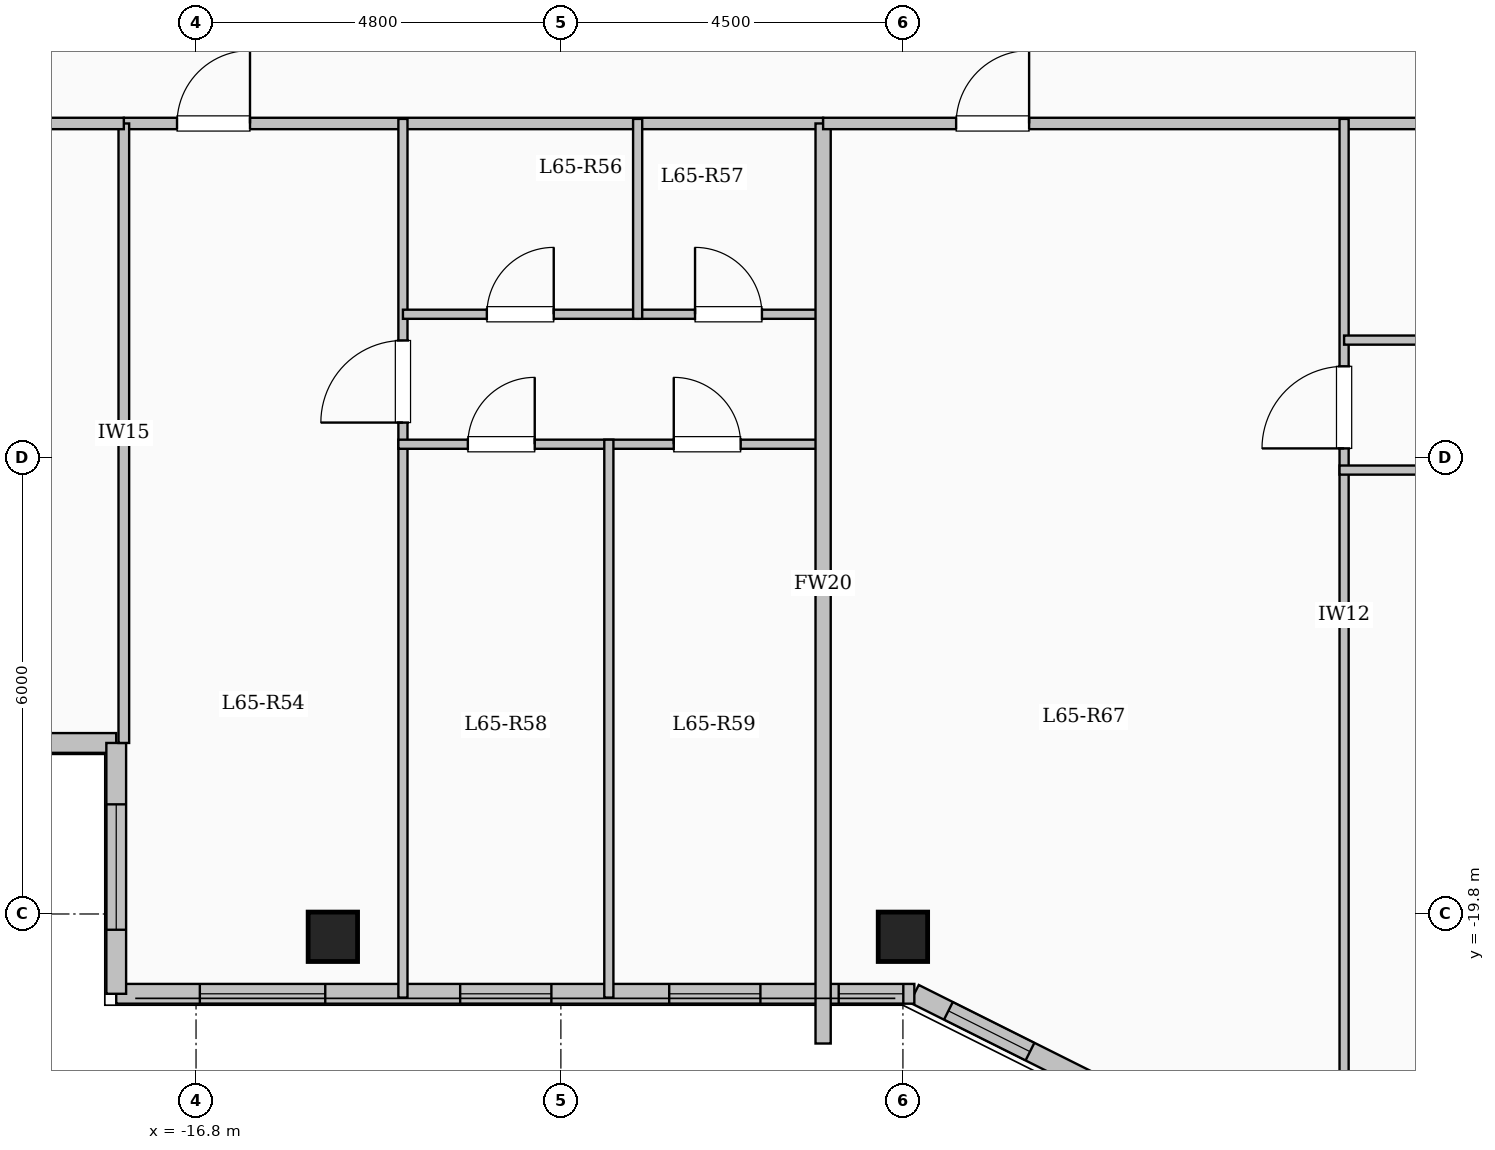
"""IFC4 building model, lengths in metres.
Left out: names, types, materials, properties, quantities, classifications, styles, units other than length and angle.
Written with IfcOpenShell. Run it as: python <this file> out.ifc"""

import sys

from ifc_helpers import new_model, si_unit, direction, frame, frame_2d, origin, origin_2d, place, context, subcontext, project, spatial, rectangle, extrude, element, fill, save


model = new_model("IFC4")
c1 = context("Model", 3, precision=1e-05, world=origin(), true_north=direction((0.0, 1.0)))
c2 = subcontext(c1, "Body", "Model", "MODEL_VIEW")
j1 = project(units=[si_unit("LENGTHUNIT", "METRE"), si_unit("PLANEANGLEUNIT", "RADIAN")], contexts=[c1])
p1 = place(None, origin())
s1 = spatial("IfcSite", under=j1, at=p1, CompositionType="ELEMENT")
p2 = place(p1, origin())
s2 = spatial("IfcBuilding", under=s1, at=p2, CompositionType="ELEMENT")
p3 = place(p2, frame((0.0, 0.0, 241.5)))
s3 = spatial("IfcBuildingStorey", under=s2, at=p3, CompositionType="ELEMENT", Elevation=241.5)
for number, where, z_axis, x_axis in (
    (1, (-15.0, -20.1, 0.0), (0.0, 0.0, 1.0), (1.0, 0.0, 0.0)),
    (2, (-7.5, -20.1, 0.0), (0.0, 0.0, 1.0), (1.0, 0.0, 0.0)),
):
    element("IfcColumn", number, at=place(p3, frame(where, z_axis=z_axis, x_axis=x_axis)), inside=s3, PredefinedType="COLUMN", context=c2, shape_type="SweptSolid", body=[
        extrude(rectangle(XDim=0.65, YDim=0.65, at=origin_2d()), origin(), (0.0, 0.0, 1.0), 3.35),
    ])
p4 = place(p3, frame((-17.85, -17.55, 0.0), z_axis=(0.0, 0.0, 1.0), x_axis=(-1.0, 0.0, 0.0)))
e3 = element("IfcWall", 3, at=p4, inside=s3, PredefinedType="SOLIDWALL", context=c2, shape_type="SweptSolid", body=[
    extrude(rectangle(XDim=4.8, YDim=0.26, at=frame_2d((2.4, 0.0))), origin(), (0.0, 0.0, 1.0), 3.1),
])
p5 = place(p4, frame((1.275, 0.0, 0.9)))
e4 = element("IfcOpeningElement", 4, at=p5, cuts=e3, PredefinedType="OPENING", context=c2, shape_type="SweptSolid", body=[
    extrude(rectangle(XDim=2.2, YDim=1.75, at=frame_2d((1.1, 0.875))), frame((0.0, 0.14, 0.0), z_axis=(0.0, -1.0, 0.0), x_axis=(1.0, 0.0, 0.0)), (0.0, 0.0, 1.0), 0.28),
])
p6 = place(p3, frame((-4.35, -22.35, 0.0), z_axis=(0.0, 0.0, 1.0), x_axis=(-0.894427191, 0.4472135955, 0.0)))
e5 = element("IfcWall", 5, at=p6, inside=s3, PredefinedType="SOLIDWALL", context=c2, shape_type="SweptSolid", body=[
    extrude(rectangle(XDim=3.354, YDim=0.26, at=frame_2d((1.677, 0.0))), origin(), (0.0, 0.0, 1.0), 3.1),
])
p7 = place(p6, frame((1.653, 0.0, 0.95)))
e6 = element("IfcOpeningElement", 6, at=p7, cuts=e5, PredefinedType="OPENING", context=c2, shape_type="SweptSolid", body=[
    extrude(rectangle(XDim=1.2, YDim=1.5, at=frame_2d((0.6, 0.75))), frame((0.0, 0.14, 0.0), z_axis=(0.0, -1.0, 0.0), x_axis=(1.0, 0.0, 0.0)), (0.0, 0.0, 1.0), 0.28),
])
p8 = place(p3, frame((-7.35, -20.85, 0.0), z_axis=(0.0, 0.0, 1.0), x_axis=(-1.0, 0.0, 0.0)))
e7 = element("IfcWall", 7, at=p8, inside=s3, PredefinedType="SOLIDWALL", context=c2, shape_type="SweptSolid", body=[
    extrude(rectangle(XDim=10.5, YDim=0.26, at=frame_2d((5.25, 0.0))), origin(), (0.0, 0.0, 1.0), 3.1),
])
p9 = place(p8, frame((0.145, 0.0, 0.95)))
e8 = element("IfcOpeningElement", 8, at=p9, cuts=e7, PredefinedType="OPENING", context=c2, shape_type="SweptSolid", body=[
    extrude(rectangle(XDim=0.85, YDim=1.5, at=frame_2d((0.425, 0.75))), frame((0.0, 0.14, 0.0), z_axis=(0.0, -1.0, 0.0), x_axis=(1.0, 0.0, 0.0)), (0.0, 0.0, 1.0), 0.28),
])
p10 = place(p8, frame((2.025, 0.0, 0.95)))
e9 = element("IfcOpeningElement", 9, at=p10, cuts=e7, PredefinedType="OPENING", context=c2, shape_type="SweptSolid", body=[
    extrude(rectangle(XDim=1.2, YDim=1.5, at=frame_2d((0.6, 0.75))), frame((0.0, 0.14, 0.0), z_axis=(0.0, -1.0, 0.0), x_axis=(1.0, 0.0, 0.0)), (0.0, 0.0, 1.0), 0.28),
])
p11 = place(p8, frame((4.775, 0.0, 0.95)))
e10 = element("IfcOpeningElement", 10, at=p11, cuts=e7, PredefinedType="OPENING", context=c2, shape_type="SweptSolid", body=[
    extrude(rectangle(XDim=1.2, YDim=1.5, at=frame_2d((0.6, 0.75))), frame((0.0, 0.14, 0.0), z_axis=(0.0, -1.0, 0.0), x_axis=(1.0, 0.0, 0.0)), (0.0, 0.0, 1.0), 0.28),
])
p12 = place(p8, frame((7.75, 0.0, 0.9)))
e11 = element("IfcOpeningElement", 11, at=p12, cuts=e7, PredefinedType="OPENING", context=c2, shape_type="SweptSolid", body=[
    extrude(rectangle(XDim=1.65, YDim=1.6, at=frame_2d((0.825, 0.8))), frame((0.0, 0.14, 0.0), z_axis=(0.0, -1.0, 0.0), x_axis=(1.0, 0.0, 0.0)), (0.0, 0.0, 1.0), 0.28),
])
p13 = place(p3, frame((-17.85, -20.85, 0.0), z_axis=(0.0, 0.0, 1.0), x_axis=(0.0, 1.0, 0.0)))
e12 = element("IfcWall", 12, at=p13, inside=s3, PredefinedType="SOLIDWALL", context=c2, shape_type="SweptSolid", body=[
    extrude(rectangle(XDim=3.3, YDim=0.26, at=frame_2d((1.65, 0.0))), origin(), (0.0, 0.0, 1.0), 3.1),
])
p14 = place(p13, frame((0.843, 0.0, 0.9)))
e13 = element("IfcOpeningElement", 13, at=p14, cuts=e12, PredefinedType="OPENING", context=c2, shape_type="SweptSolid", body=[
    extrude(rectangle(XDim=1.65, YDim=1.6, at=frame_2d((0.825, 0.8))), frame((0.0, 0.14, 0.0), z_axis=(0.0, -1.0, 0.0), x_axis=(1.0, 0.0, 0.0)), (0.0, 0.0, 1.0), 0.28),
])
p15 = place(p3, frame((-17.75, -9.4, 0.0), z_axis=(0.0, 0.0, 1.0), x_axis=(1.0, 0.0, 0.0)))
e14 = element("IfcWall", 14, at=p15, inside=s3, PredefinedType="PARTITIONING", context=c2, shape_type="SweptSolid", body=[
    extrude(rectangle(XDim=9.2, YDim=0.15, at=frame_2d((4.6, 0.0))), origin(), (0.0, 0.0, 1.0), 3.1),
])
p16 = place(p15, frame((0.7, 0.0, 0.0)))
e15 = element("IfcOpeningElement", 15, at=p16, cuts=e14, PredefinedType="OPENING", context=c2, shape_type="SweptSolid", body=[
    extrude(rectangle(XDim=0.96, YDim=2.15, at=frame_2d((0.48, 1.075))), frame((0.0, 0.085, 0.0), z_axis=(0.0, -1.0, 0.0), x_axis=(1.0, 0.0, 0.0)), (0.0, 0.0, 1.0), 0.17),
])
p17 = place(p3, frame((-14.078, -20.9, 0.0), z_axis=(0.0, 0.0, 1.0), x_axis=(0.0, 1.0, 0.0)))
e16 = element("IfcWall", 16, at=p17, inside=s3, PredefinedType="PARTITIONING", context=c2, shape_type="SweptSolid", body=[
    extrude(rectangle(XDim=11.56, YDim=0.12, at=frame_2d((5.78, 0.0))), origin(), (0.0, 0.0, 1.0), 3.1),
])
p18 = place(p17, frame((7.565, 0.0, 0.0)))
e17 = element("IfcOpeningElement", 17, at=p18, cuts=e16, PredefinedType="OPENING", context=c2, shape_type="SweptSolid", body=[
    extrude(rectangle(XDim=1.08, YDim=2.15, at=frame_2d((0.54, 1.075))), frame((0.0, 0.07, 0.0), z_axis=(0.0, -1.0, 0.0), x_axis=(1.0, 0.0, 0.0)), (0.0, 0.0, 1.0), 0.14),
])
p19 = place(p3, frame((-14.078, -11.91, 0.0), z_axis=(0.0, 0.0, 1.0), x_axis=(1.0, 0.0, 0.0)))
e18 = element("IfcWall", 18, at=p19, inside=s3, PredefinedType="PARTITIONING", context=c2, shape_type="SweptSolid", body=[
    extrude(rectangle(XDim=3.088, YDim=0.12, at=frame_2d((1.544, 0.0))), origin(), (0.0, 0.0, 1.0), 3.1),
])
p20 = place(p19, frame((1.104, 0.0, 0.0)))
e19 = element("IfcOpeningElement", 19, at=p20, cuts=e18, PredefinedType="OPENING", context=c2, shape_type="SweptSolid", body=[
    extrude(rectangle(XDim=0.88, YDim=2.1, at=frame_2d((0.44, 1.05))), frame((0.0, 0.07, 0.0), z_axis=(0.0, -1.0, 0.0), x_axis=(1.0, 0.0, 0.0)), (0.0, 0.0, 1.0), 0.14),
])
p21 = place(p3, frame((-10.99, -11.91, 0.0), z_axis=(0.0, 0.0, 1.0), x_axis=(1.0, 0.0, 0.0)))
e20 = element("IfcWall", 20, at=p21, inside=s3, PredefinedType="PARTITIONING", context=c2, shape_type="SweptSolid", body=[
    extrude(rectangle(XDim=2.39, YDim=0.12, at=frame_2d((1.195, 0.0))), origin(), (0.0, 0.0, 1.0), 3.1),
])
p22 = place(p21, frame((0.755, 0.0, 0.0)))
e21 = element("IfcOpeningElement", 21, at=p22, cuts=e20, PredefinedType="OPENING", context=c2, shape_type="SweptSolid", body=[
    extrude(rectangle(XDim=0.88, YDim=2.1, at=frame_2d((0.44, 1.05))), frame((0.0, 0.07, 0.0), z_axis=(0.0, -1.0, 0.0), x_axis=(1.0, 0.0, 0.0)), (0.0, 0.0, 1.0), 0.14),
])
p23 = place(p3, frame((-14.138, -13.62, 0.0), z_axis=(0.0, 0.0, 1.0), x_axis=(1.0, 0.0, 0.0)))
e22 = element("IfcWall", 22, at=p23, inside=s3, PredefinedType="PARTITIONING", context=c2, shape_type="SweptSolid", body=[
    extrude(rectangle(XDim=5.598, YDim=0.12, at=frame_2d((2.799, 0.0))), origin(), (0.0, 0.0, 1.0), 3.1),
])
p24 = place(p23, frame((0.914, 0.0, 0.0)))
e23 = element("IfcOpeningElement", 23, at=p24, cuts=e22, PredefinedType="OPENING", context=c2, shape_type="SweptSolid", body=[
    extrude(rectangle(XDim=0.88, YDim=2.1, at=frame_2d((0.44, 1.05))), frame((0.0, 0.07, 0.0), z_axis=(0.0, -1.0, 0.0), x_axis=(1.0, 0.0, 0.0)), (0.0, 0.0, 1.0), 0.14),
])
p25 = place(p23, frame((3.623, 0.0, 0.0)))
e24 = element("IfcOpeningElement", 24, at=p25, cuts=e22, PredefinedType="OPENING", context=c2, shape_type="SweptSolid", body=[
    extrude(rectangle(XDim=0.88, YDim=2.1, at=frame_2d((0.44, 1.05))), frame((0.0, 0.07, 0.0), z_axis=(0.0, -1.0, 0.0), x_axis=(1.0, 0.0, 0.0)), (0.0, 0.0, 1.0), 0.14),
])
p26 = place(p3, frame((-10.99, -11.97, 0.0), z_axis=(0.0, 0.0, 1.0), x_axis=(0.0, 1.0, 0.0)))
e25 = element("IfcWall", 25, at=p26, inside=s3, PredefinedType="PARTITIONING", context=c2, shape_type="SweptSolid", body=[
    extrude(rectangle(XDim=2.63, YDim=0.12, at=frame_2d((1.315, 0.0))), origin(), (0.0, 0.0, 1.0), 3.1),
])
p27 = place(p3, frame((-11.369, -20.9, 0.0), z_axis=(0.0, 0.0, 1.0), x_axis=(0.0, 1.0, 0.0)))
e26 = element("IfcWall", 26, at=p27, inside=s3, PredefinedType="PARTITIONING", context=c2, shape_type="SweptSolid", body=[
    extrude(rectangle(XDim=7.34, YDim=0.12, at=frame_2d((3.67, 0.0))), origin(), (0.0, 0.0, 1.0), 3.1),
])
p28 = place(p3, frame((-8.55, -21.504, 0.0), z_axis=(0.0, 0.0, 1.0), x_axis=(0.0, 1.0, 0.0)))
e27 = element("IfcWall", 27, at=p28, inside=s3, PredefinedType="SOLIDWALL", context=c2, shape_type="SweptSolid", body=[
    extrude(rectangle(XDim=12.104, YDim=0.2, at=frame_2d((6.052, 0.0))), origin(), (0.0, 0.0, 1.0), 3.1),
])
p29 = place(p3, frame((-8.55, -9.4, 0.0), z_axis=(0.0, 0.0, 1.0), x_axis=(1.0, 0.0, 0.0)))
e28 = element("IfcWall", 28, at=p29, inside=s3, PredefinedType="PARTITIONING", context=c2, shape_type="SweptSolid", body=[
    extrude(rectangle(XDim=17.1, YDim=0.15, at=frame_2d((8.55, 0.0))), origin(), (0.0, 0.0, 1.0), 3.1),
])
p30 = place(p29, frame((1.75, 0.0, 0.0)))
e29 = element("IfcOpeningElement", 29, at=p30, cuts=e28, PredefinedType="OPENING", context=c2, shape_type="SweptSolid", body=[
    extrude(rectangle(XDim=0.96, YDim=2.15, at=frame_2d((0.48, 1.075))), frame((0.0, 0.085, 0.0), z_axis=(0.0, -1.0, 0.0), x_axis=(1.0, 0.0, 0.0)), (0.0, 0.0, 1.0), 0.17),
])
p31 = place(p3, frame((-1.696, -22.38, 0.0), z_axis=(0.0, 0.0, 1.0), x_axis=(0.0, 1.0, 0.0)))
e30 = element("IfcWall", 30, at=p31, inside=s3, PredefinedType="PARTITIONING", context=c2, shape_type="SweptSolid", body=[
    extrude(rectangle(XDim=13.04, YDim=0.12, at=frame_2d((6.52, 0.0))), origin(), (0.0, 0.0, 1.0), 3.1),
])
p32 = place(p31, frame((8.705, 0.0, 0.0)))
e31 = element("IfcOpeningElement", 31, at=p32, cuts=e30, PredefinedType="OPENING", context=c2, shape_type="SweptSolid", body=[
    extrude(rectangle(XDim=1.08, YDim=2.15, at=frame_2d((0.54, 1.075))), frame((0.0, 0.07, 0.0), z_axis=(0.0, -1.0, 0.0), x_axis=(1.0, 0.0, 0.0)), (0.0, 0.0, 1.0), 0.14),
])
p33 = place(p3, frame((-1.696, -12.25, 0.0), z_axis=(0.0, 0.0, 1.0), x_axis=(1.0, 0.0, 0.0)))
e32 = element("IfcWall", 32, at=p33, inside=s3, PredefinedType="PARTITIONING", context=c2, shape_type="SweptSolid", body=[
    extrude(rectangle(XDim=5.393, YDim=0.12, at=frame_2d((2.697, 0.0))), origin(), (0.0, 0.0, 1.0), 2.785),
])
p34 = place(p33, frame((2.256, 0.0, 0.0)))
e33 = element("IfcOpeningElement", 33, at=p34, cuts=e32, PredefinedType="OPENING", context=c2, shape_type="SweptSolid", body=[
    extrude(rectangle(XDim=0.88, YDim=2.1, at=frame_2d((0.44, 1.05))), frame((0.0, 0.07, 0.0), z_axis=(0.0, -1.0, 0.0), x_axis=(1.0, 0.0, 0.0)), (0.0, 0.0, 1.0), 0.14),
])
p35 = place(p3, frame((-1.756, -13.96, 0.0), z_axis=(0.0, 0.0, 1.0), x_axis=(1.0, 0.0, 0.0)))
e34 = element("IfcWall", 34, at=p35, inside=s3, PredefinedType="PARTITIONING", context=c2, shape_type="SweptSolid", body=[
    extrude(rectangle(XDim=10.366, YDim=0.12, at=frame_2d((5.183, 0.0))), origin(), (0.0, 0.0, 1.0), 2.785),
])
p36 = place(p35, frame((1.256, 0.0, 0.0)))
e35 = element("IfcOpeningElement", 35, at=p36, cuts=e34, PredefinedType="OPENING", context=c2, shape_type="SweptSolid", body=[
    extrude(rectangle(XDim=0.88, YDim=2.1, at=frame_2d((0.44, 1.05))), frame((0.0, 0.07, 0.0), z_axis=(0.0, -1.0, 0.0), x_axis=(1.0, 0.0, 0.0)), (0.0, 0.0, 1.0), 0.14),
])
p37 = place(p35, frame((4.648, 0.0, 0.0)))
e36 = element("IfcOpeningElement", 36, at=p37, cuts=e34, PredefinedType="OPENING", context=c2, shape_type="SweptSolid", body=[
    extrude(rectangle(XDim=0.88, YDim=2.1, at=frame_2d((0.44, 1.05))), frame((0.0, 0.07, 0.0), z_axis=(0.0, -1.0, 0.0), x_axis=(1.0, 0.0, 0.0)), (0.0, 0.0, 1.0), 0.14),
])
p38 = place(p35, frame((8.04, 0.0, 0.0)))
e37 = element("IfcOpeningElement", 37, at=p38, cuts=e34, PredefinedType="OPENING", context=c2, shape_type="SweptSolid", body=[
    extrude(rectangle(XDim=0.88, YDim=2.1, at=frame_2d((0.44, 1.05))), frame((0.0, 0.07, 0.0), z_axis=(0.0, -1.0, 0.0), x_axis=(1.0, 0.0, 0.0)), (0.0, 0.0, 1.0), 0.14),
])
p39 = place(p3, frame((-17.75, -17.55, 0.0), z_axis=(0.0, 0.0, 1.0), x_axis=(0.0, 1.0, 0.0)))
e38 = element("IfcWall", 38, at=p39, inside=s3, PredefinedType="PARTITIONING", context=c2, shape_type="SweptSolid", body=[
    extrude(rectangle(XDim=8.15, YDim=0.14, at=frame_2d((4.075, 0.0))), origin(), (0.0, 0.0, 1.0), 3.1),
])
p40 = place(p3, frame((-22.68, -9.4, 0.0), z_axis=(0.0, 0.0, 1.0), x_axis=(1.0, 0.0, 0.0)))
e39 = element("IfcWall", 39, at=p40, inside=s3, PredefinedType="PARTITIONING", context=c2, shape_type="SweptSolid", body=[
    extrude(rectangle(XDim=4.93, YDim=0.15, at=frame_2d((2.465, 0.0))), origin(), (0.0, 0.0, 1.0), 3.1),
])
p41 = place(p40, frame((1.99, 0.0, 0.0)))
e40 = element("IfcOpeningElement", 40, at=p41, cuts=e39, PredefinedType="OPENING", context=c2, shape_type="SweptSolid", body=[
    extrude(rectangle(XDim=0.95, YDim=2.15, at=frame_2d((0.475, 1.075))), frame((0.0, 0.085, 0.0), z_axis=(0.0, -1.0, 0.0), x_axis=(1.0, 0.0, 0.0)), (0.0, 0.0, 1.0), 0.17),
])
p42 = place(p7, origin())
e41 = element("IfcWindow", 41, at=p42, inside=s3, PartitioningType="SINGLE_PANEL", PredefinedType="WINDOW", context=c2, shape_type="SweptSolid", body=[
    extrude(rectangle(XDim=1.2, YDim=1.5, at=frame_2d((0.6, 0.75))), frame((0.0, 0.03, 0.0), z_axis=(0.0, -1.0, 0.0), x_axis=(1.0, 0.0, 0.0)), (0.0, 0.0, 1.0), 0.06),
])
fill(e6, e41)
p43 = place(p9, origin())
e42 = element("IfcWindow", 42, at=p43, inside=s3, PartitioningType="SINGLE_PANEL", PredefinedType="WINDOW", context=c2, shape_type="SweptSolid", body=[
    extrude(rectangle(XDim=0.85, YDim=1.5, at=frame_2d((0.425, 0.75))), frame((0.0, 0.03, 0.0), z_axis=(0.0, -1.0, 0.0), x_axis=(1.0, 0.0, 0.0)), (0.0, 0.0, 1.0), 0.06),
])
fill(e8, e42)
p44 = place(p10, origin())
e43 = element("IfcWindow", 43, at=p44, inside=s3, PartitioningType="SINGLE_PANEL", PredefinedType="WINDOW", context=c2, shape_type="SweptSolid", body=[
    extrude(rectangle(XDim=1.2, YDim=1.5, at=frame_2d((0.6, 0.75))), frame((0.0, 0.03, 0.0), z_axis=(0.0, -1.0, 0.0), x_axis=(1.0, 0.0, 0.0)), (0.0, 0.0, 1.0), 0.06),
])
fill(e9, e43)
p45 = place(p11, origin())
e44 = element("IfcWindow", 44, at=p45, inside=s3, PartitioningType="SINGLE_PANEL", PredefinedType="WINDOW", context=c2, shape_type="SweptSolid", body=[
    extrude(rectangle(XDim=1.2, YDim=1.5, at=frame_2d((0.6, 0.75))), frame((0.0, 0.03, 0.0), z_axis=(0.0, -1.0, 0.0), x_axis=(1.0, 0.0, 0.0)), (0.0, 0.0, 1.0), 0.06),
])
fill(e10, e44)
p46 = place(p12, origin())
e45 = element("IfcWindow", 45, at=p46, inside=s3, PartitioningType="SINGLE_PANEL", PredefinedType="WINDOW", context=c2, shape_type="SweptSolid", body=[
    extrude(rectangle(XDim=1.65, YDim=1.6, at=frame_2d((0.825, 0.8))), frame((0.0, 0.03, 0.0), z_axis=(0.0, -1.0, 0.0), x_axis=(1.0, 0.0, 0.0)), (0.0, 0.0, 1.0), 0.06),
])
fill(e11, e45)
p47 = place(p14, origin())
e46 = element("IfcWindow", 46, at=p47, inside=s3, PartitioningType="SINGLE_PANEL", PredefinedType="WINDOW", context=c2, shape_type="SweptSolid", body=[
    extrude(rectangle(XDim=1.65, YDim=1.6, at=frame_2d((0.825, 0.8))), frame((0.0, 0.03, 0.0), z_axis=(0.0, -1.0, 0.0), x_axis=(1.0, 0.0, 0.0)), (0.0, 0.0, 1.0), 0.06),
])
fill(e13, e46)
p48 = place(p16, origin())
e47 = element("IfcDoor", 47, at=p48, inside=s3, OperationType="SINGLE_SWING_RIGHT", PredefinedType="DOOR", context=c2, shape_type="SweptSolid", body=[
    extrude(rectangle(XDim=0.96, YDim=2.15, at=frame_2d((0.48, 1.075))), frame((0.0, 0.025, 0.0), z_axis=(0.0, -1.0, 0.0), x_axis=(1.0, 0.0, 0.0)), (0.0, 0.0, 1.0), 0.05),
])
fill(e15, e47)
p49 = place(p18, origin())
e48 = element("IfcDoor", 48, at=p49, inside=s3, OperationType="SINGLE_SWING_LEFT", PredefinedType="DOOR", context=c2, shape_type="SweptSolid", body=[
    extrude(rectangle(XDim=1.08, YDim=2.15, at=frame_2d((0.54, 1.075))), frame((0.0, 0.025, 0.0), z_axis=(0.0, -1.0, 0.0), x_axis=(1.0, 0.0, 0.0)), (0.0, 0.0, 1.0), 0.05),
])
fill(e17, e48)
p50 = place(p20, origin())
e49 = element("IfcDoor", 49, at=p50, inside=s3, OperationType="SINGLE_SWING_RIGHT", PredefinedType="DOOR", context=c2, shape_type="SweptSolid", body=[
    extrude(rectangle(XDim=0.88, YDim=2.1, at=frame_2d((0.44, 1.05))), frame((0.0, 0.025, 0.0), z_axis=(0.0, -1.0, 0.0), x_axis=(1.0, 0.0, 0.0)), (0.0, 0.0, 1.0), 0.05),
])
fill(e19, e49)
p51 = place(p22, origin())
e50 = element("IfcDoor", 50, at=p51, inside=s3, OperationType="SINGLE_SWING_LEFT", PredefinedType="DOOR", context=c2, shape_type="SweptSolid", body=[
    extrude(rectangle(XDim=0.88, YDim=2.1, at=frame_2d((0.44, 1.05))), frame((0.0, 0.025, 0.0), z_axis=(0.0, -1.0, 0.0), x_axis=(1.0, 0.0, 0.0)), (0.0, 0.0, 1.0), 0.05),
])
fill(e21, e50)
p52 = place(p24, origin())
e51 = element("IfcDoor", 51, at=p52, inside=s3, OperationType="SINGLE_SWING_RIGHT", PredefinedType="DOOR", context=c2, shape_type="SweptSolid", body=[
    extrude(rectangle(XDim=0.88, YDim=2.1, at=frame_2d((0.44, 1.05))), frame((0.0, 0.025, 0.0), z_axis=(0.0, -1.0, 0.0), x_axis=(1.0, 0.0, 0.0)), (0.0, 0.0, 1.0), 0.05),
])
fill(e23, e51)
p53 = place(p25, origin())
e52 = element("IfcDoor", 52, at=p53, inside=s3, OperationType="SINGLE_SWING_LEFT", PredefinedType="DOOR", context=c2, shape_type="SweptSolid", body=[
    extrude(rectangle(XDim=0.88, YDim=2.1, at=frame_2d((0.44, 1.05))), frame((0.0, 0.025, 0.0), z_axis=(0.0, -1.0, 0.0), x_axis=(1.0, 0.0, 0.0)), (0.0, 0.0, 1.0), 0.05),
])
fill(e24, e52)
p54 = place(p30, origin())
e53 = element("IfcDoor", 53, at=p54, inside=s3, OperationType="SINGLE_SWING_RIGHT", PredefinedType="DOOR", context=c2, shape_type="SweptSolid", body=[
    extrude(rectangle(XDim=0.96, YDim=2.15, at=frame_2d((0.48, 1.075))), frame((0.0, 0.025, 0.0), z_axis=(0.0, -1.0, 0.0), x_axis=(1.0, 0.0, 0.0)), (0.0, 0.0, 1.0), 0.05),
])
fill(e29, e53)
p55 = place(p32, origin())
e54 = element("IfcDoor", 54, at=p55, inside=s3, OperationType="SINGLE_SWING_LEFT", PredefinedType="DOOR", context=c2, shape_type="SweptSolid", body=[
    extrude(rectangle(XDim=1.08, YDim=2.15, at=frame_2d((0.54, 1.075))), frame((0.0, 0.025, 0.0), z_axis=(0.0, -1.0, 0.0), x_axis=(1.0, 0.0, 0.0)), (0.0, 0.0, 1.0), 0.05),
])
fill(e31, e54)
save(model, sys.argv[1])
